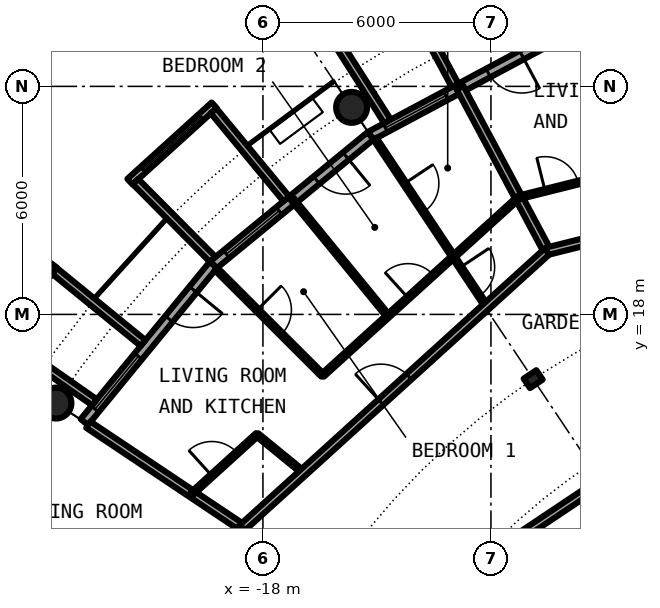
"""IFC4 building model, lengths in metres.
Left out: names, types, materials, properties, quantities, classifications, styles, units other than length and angle.
Written with IfcOpenShell. Run it as: python <this file> out.ifc"""

import sys

from ifc_helpers import new_model, si_unit, direction, frame, frame_2d, origin, origin_2d, place, context, subcontext, project, spatial, rectangle, circle, hollow_circle, i_section, extrude, element, fill, save


model = new_model("IFC4")
c1 = context("Model", 3, precision=1e-05, world=origin(), true_north=direction((0.0, 1.0)))
c2 = subcontext(c1, "Body", "Model", "MODEL_VIEW")
j1 = project(units=[si_unit("LENGTHUNIT", "METRE"), si_unit("PLANEANGLEUNIT", "RADIAN")], contexts=[c1])
p1 = place(None, origin())
s1 = spatial("IfcSite", under=j1, at=p1, CompositionType="ELEMENT")
p2 = place(p1, origin())
s2 = spatial("IfcBuilding", under=s1, at=p2, CompositionType="ELEMENT")
p3 = place(p2, frame((0.0, 0.0, 190.2)))
s3 = spatial("IfcBuildingStorey", under=s2, at=p3, CompositionType="ELEMENT", Elevation=190.2)
for number, where, z_axis, x_axis in (
    (1, (-15.667, 23.448, 0.0), (0.0, 0.0, 1.0), (1.0, 0.0, 0.0)),
    (2, (-23.448, 15.667, 0.0), (0.0, 0.0, 1.0), (1.0, 0.0, 0.0)),
):
    element("IfcColumn", number, at=place(p3, frame(where, z_axis=z_axis, x_axis=x_axis)), inside=s3, PredefinedType="COLUMN", context=c2, shape_type="SweptSolid", body=[
        extrude(hollow_circle(Radius=0.406, WallThickness=0.03, at=origin_2d()), origin(), (0.0, 0.0, 1.0), 3.05),
    ])
p4 = place(p3, frame((-10.889, 16.297, 0.0), z_axis=(0.0, 0.0, 1.0), x_axis=(-0.55557023302, 0.831469612303, 0.0)))
e3 = element("IfcColumn", 3, at=p4, inside=s3, PredefinedType="COLUMN", context=c2, shape_type="SweptSolid", body=[
    extrude(i_section(OverallWidth=0.3, OverallDepth=0.4, WebThickness=0.013, FlangeThickness=0.024, FilletRadius=0.027, at=origin_2d()), origin(), (0.0, 0.0, 1.0), 3.05),
])
p5 = place(p3, frame((-10.447, 25.222, 0.0), z_axis=(0.0, 0.0, 1.0), x_axis=(-0.881915646801, -0.471407246368, 0.0)))
e4 = element("IfcWall", 4, at=p5, inside=s3, PredefinedType="SOLIDWALL", context=c2, shape_type="SweptSolid", body=[
    extrude(rectangle(XDim=5.352, YDim=0.25, at=frame_2d((2.676, 0.0))), origin(), (0.0, 0.0, 1.0), 2.7),
])
p6 = place(p5, frame((0.841, 0.0, 0.0)))
e5 = element("IfcOpeningElement", 5, at=p6, cuts=e4, PredefinedType="OPENING", context=c2, shape_type="SweptSolid", body=[
    extrude(rectangle(XDim=1.0, YDim=2.2, at=frame_2d((0.5, 1.1))), frame((0.0, 0.135, 0.0), z_axis=(0.0, -1.0, 0.0), x_axis=(1.0, 0.0, 0.0)), (0.0, 0.0, 1.0), 0.27),
])
p7 = place(p5, frame((3.111, 0.0, 0.3)))
e6 = element("IfcOpeningElement", 6, at=p7, cuts=e4, PredefinedType="OPENING", context=c2, shape_type="SweptSolid", body=[
    extrude(rectangle(XDim=1.8, YDim=2.1, at=frame_2d((0.9, 1.05))), frame((0.0, 0.135, 0.0), z_axis=(0.0, -1.0, 0.0), x_axis=(1.0, 0.0, 0.0)), (0.0, 0.0, 1.0), 0.27),
])
p8 = place(p3, frame((-12.945, 24.029, -0.03), z_axis=(0.0, 0.0, 1.0), x_axis=(-0.474424310775, 0.88029629861, 0.0)))
e7 = element("IfcWall", 7, at=p8, inside=s3, PredefinedType="SOLIDWALL", context=c2, shape_type="SweptSolid", body=[
    extrude(rectangle(XDim=3.006, YDim=0.2, at=frame_2d((1.503, 0.0))), origin(), (0.0, 0.0, 1.0), 2.73),
])
p9 = place(p3, frame((-14.722, 23.079, -0.03), z_axis=(0.0, 0.0, 1.0), x_axis=(-0.537572179146, 0.843217737129, 0.0)))
e8 = element("IfcWall", 8, at=p9, inside=s3, PredefinedType="SOLIDWALL", context=c2, shape_type="SweptSolid", body=[
    extrude(rectangle(XDim=2.924, YDim=0.2, at=frame_2d((1.462, 0.0))), origin(), (0.0, 0.0, 1.0), 2.73),
])
p10 = place(p3, frame((-15.167, 22.699, 0.0), z_axis=(0.0, 0.0, 1.0), x_axis=(-0.773019449054, -0.634382322723, 0.0)))
e9 = element("IfcWall", 9, at=p10, inside=s3, PredefinedType="SOLIDWALL", context=c2, shape_type="SweptSolid", body=[
    extrude(rectangle(XDim=5.352, YDim=0.25, at=frame_2d((2.676, 0.0))), origin(), (0.0, 0.0, 1.0), 2.7),
])
p11 = place(p10, frame((0.841, 0.0, 0.0)))
e10 = element("IfcOpeningElement", 10, at=p11, cuts=e9, PredefinedType="OPENING", context=c2, shape_type="SweptSolid", body=[
    extrude(rectangle(XDim=1.0, YDim=2.2, at=frame_2d((0.5, 1.1))), frame((0.0, 0.135, 0.0), z_axis=(0.0, -1.0, 0.0), x_axis=(1.0, 0.0, 0.0)), (0.0, 0.0, 1.0), 0.27),
])
p12 = place(p10, frame((3.111, 0.0, 0.3)))
e11 = element("IfcOpeningElement", 11, at=p12, cuts=e9, PredefinedType="OPENING", context=c2, shape_type="SweptSolid", body=[
    extrude(rectangle(XDim=1.8, YDim=2.1, at=frame_2d((0.9, 1.05))), frame((0.0, 0.135, 0.0), z_axis=(0.0, -1.0, 0.0), x_axis=(1.0, 0.0, 0.0)), (0.0, 0.0, 1.0), 0.27),
])
p13 = place(p3, frame((-19.282, 23.503, -0.03), z_axis=(0.0, 0.0, 1.0), x_axis=(-0.740998365753, -0.671506829416, 0.0)))
e12 = element("IfcWall", 12, at=p13, inside=s3, PredefinedType="SOLIDWALL", context=c2, shape_type="SweptSolid", body=[
    extrude(rectangle(XDim=2.993, YDim=0.2, at=frame_2d((1.497, 0.0))), origin(), (0.0, 0.0, 1.0), 2.73),
])
p14 = place(p13, frame((0.457, 0.0, 0.33)))
e13 = element("IfcOpeningElement", 13, at=p14, cuts=e12, PredefinedType="OPENING", context=c2, shape_type="SweptSolid", body=[
    extrude(circle(Radius=1.04, at=frame_2d((1.04, 1.04))), frame((0.0, 0.11, 0.0), z_axis=(0.0, -1.0, 0.0), x_axis=(1.0, 0.0, 0.0)), (0.0, 0.0, 1.0), 0.22),
])
p15 = place(p3, frame((-17.384, 21.041, -0.03), z_axis=(0.0, 0.0, 1.0), x_axis=(-0.63709551667, 0.770784861449, 0.0)))
e14 = element("IfcWall", 14, at=p15, inside=s3, PredefinedType="SOLIDWALL", context=c2, shape_type="SweptSolid", body=[
    extrude(rectangle(XDim=3.006, YDim=0.2, at=frame_2d((1.503, 0.0))), origin(), (0.0, 0.0, 1.0), 2.73),
])
p16 = place(p3, frame((-19.323, 19.45, -0.03), z_axis=(0.0, 0.0, 1.0), x_axis=(-0.704476739375, 0.709727076896, 0.0)))
e15 = element("IfcWall", 15, at=p16, inside=s3, PredefinedType="SOLIDWALL", context=c2, shape_type="SweptSolid", body=[
    extrude(rectangle(XDim=2.883, YDim=0.2, at=frame_2d((1.441, 0.0))), origin(), (0.0, 0.0, 1.0), 2.73),
])
p17 = place(p3, frame((-19.304, 19.304, 0.0), z_axis=(0.0, 0.0, 1.0), x_axis=(-0.634382322723, -0.773019449054, 0.0)))
e16 = element("IfcWall", 16, at=p17, inside=s3, PredefinedType="SOLIDWALL", context=c2, shape_type="SweptSolid", body=[
    extrude(rectangle(XDim=5.352, YDim=0.25, at=frame_2d((2.676, 0.0))), origin(), (0.0, 0.0, 1.0), 2.7),
])
p18 = place(p17, frame((0.841, 0.0, 0.0)))
e17 = element("IfcOpeningElement", 17, at=p18, cuts=e16, PredefinedType="OPENING", context=c2, shape_type="SweptSolid", body=[
    extrude(rectangle(XDim=1.0, YDim=2.2, at=frame_2d((0.5, 1.1))), frame((0.0, 0.135, 0.0), z_axis=(0.0, -1.0, 0.0), x_axis=(1.0, 0.0, 0.0)), (0.0, 0.0, 1.0), 0.27),
])
p19 = place(p17, frame((3.111, 0.0, 0.3)))
e18 = element("IfcOpeningElement", 18, at=p19, cuts=e16, PredefinedType="OPENING", context=c2, shape_type="SweptSolid", body=[
    extrude(rectangle(XDim=1.8, YDim=2.1, at=frame_2d((0.9, 1.05))), frame((0.0, 0.135, 0.0), z_axis=(0.0, -1.0, 0.0), x_axis=(1.0, 0.0, 0.0)), (0.0, 0.0, 1.0), 0.27),
])
p20 = place(p3, frame((-23.497, 19.289, -0.03), z_axis=(0.0, 0.0, 1.0), x_axis=(-0.602806268067, -0.797887588059, 0.0)))
e19 = element("IfcWall", 19, at=p20, inside=s3, PredefinedType="SOLIDWALL", context=c2, shape_type="SweptSolid", body=[
    extrude(rectangle(XDim=2.447, YDim=0.2, at=frame_2d((1.223, 0.0))), origin(), (0.0, 0.0, 1.0), 2.73),
])
p21 = place(p20, frame((0.183, 0.0, 0.33)))
e20 = element("IfcOpeningElement", 20, at=p21, cuts=e19, PredefinedType="OPENING", context=c2, shape_type="SweptSolid", body=[
    extrude(circle(Radius=1.04, at=frame_2d((1.04, 1.04))), frame((0.0, 0.11, 0.0), z_axis=(0.0, -1.0, 0.0), x_axis=(1.0, 0.0, 0.0)), (0.0, 0.0, 1.0), 0.22),
])
p22 = place(p3, frame((-21.155, 17.246, -0.03), z_axis=(0.0, 0.0, 1.0), x_axis=(-0.775179004516, 0.631741648902, 0.0)))
e21 = element("IfcWall", 21, at=p22, inside=s3, PredefinedType="SOLIDWALL", context=c2, shape_type="SweptSolid", body=[
    extrude(rectangle(XDim=3.006, YDim=0.2, at=frame_2d((1.503, 0.0))), origin(), (0.0, 0.0, 1.0), 2.73),
])
p23 = place(p3, frame((-22.433, 15.688, -0.03), z_axis=(0.0, 0.0, 1.0), x_axis=(-0.819373043115, 0.573260687834, 0.0)))
e22 = element("IfcWall", 22, at=p23, inside=s3, PredefinedType="SOLIDWALL", context=c2, shape_type="SweptSolid", body=[
    extrude(rectangle(XDim=2.925, YDim=0.2, at=frame_2d((1.463, 0.0))), origin(), (0.0, 0.0, 1.0), 2.73),
])
p24 = place(p3, frame((-22.595, 15.098, 0.0), z_axis=(0.0, 0.0, 1.0), x_axis=(0.831387096605, -0.55569370664, 0.0)))
e23 = element("IfcWall", 23, at=p24, inside=s3, PredefinedType="PARTITIONING", context=c2, shape_type="SweptSolid", body=[
    extrude(rectangle(XDim=4.875, YDim=0.2, at=frame_2d((2.438, 0.0))), origin(), (0.0, 0.0, 1.0), 2.7),
])
p25 = place(p3, frame((-19.234, 19.197, 0.0), z_axis=(0.0, 0.0, 1.0), x_axis=(0.707722727509, -0.706490297858, 0.0)))
e24 = element("IfcWall", 24, at=p25, inside=s3, PredefinedType="PARTITIONING", context=c2, shape_type="SweptSolid", body=[
    extrude(rectangle(XDim=3.962, YDim=0.1, at=frame_2d((1.981, 0.0))), origin(), (0.0, 0.0, 1.0), 2.7),
])
p26 = place(p25, frame((1.531, 0.0, 0.0)))
e25 = element("IfcOpeningElement", 25, at=p26, cuts=e24, PredefinedType="OPENING", context=c2, shape_type="SweptSolid", body=[
    extrude(rectangle(XDim=0.9, YDim=2.3, at=frame_2d((0.45, 1.15))), frame((0.0, 0.06, 0.0), z_axis=(0.0, -1.0, 0.0), x_axis=(1.0, 0.0, 0.0)), (0.0, 0.0, 1.0), 0.12),
])
p27 = place(p3, frame((-18.154, 14.834, 0.0), z_axis=(0.0, 0.0, 1.0), x_axis=(0.774345345452, -0.632763214779, 0.0)))
e26 = element("IfcWall", 26, at=p27, inside=s3, PredefinedType="PARTITIONING", context=c2, shape_type="SweptSolid", body=[
    extrude(rectangle(XDim=1.569, YDim=0.1, at=frame_2d((0.785, 0.0))), origin(), (0.0, 0.0, 1.0), 2.7),
])
p28 = place(p3, frame((-17.219, 21.023, 0.0), z_axis=(0.0, 0.0, 1.0), x_axis=(0.633590098448, -0.773668913133, 0.0)))
e27 = element("IfcWall", 27, at=p28, inside=s3, PredefinedType="PARTITIONING", context=c2, shape_type="SweptSolid", body=[
    extrude(rectangle(XDim=3.962, YDim=0.1, at=frame_2d((1.981, 0.0))), origin(), (0.0, 0.0, 1.0), 2.7),
])
p29 = place(p3, frame((-15.054, 22.624, 0.0), z_axis=(0.0, 0.0, 1.0), x_axis=(0.553913391217, -0.832574294, 0.0)))
e28 = element("IfcWall", 28, at=p29, inside=s3, PredefinedType="PARTITIONING", context=c2, shape_type="SweptSolid", body=[
    extrude(rectangle(XDim=5.301, YDim=0.1, at=frame_2d((2.65, 0.0))), origin(), (0.0, 0.0, 1.0), 2.7),
])
p30 = place(p29, frame((4.065, 0.0, 0.0)))
e29 = element("IfcOpeningElement", 29, at=p30, cuts=e28, PredefinedType="OPENING", context=c2, shape_type="SweptSolid", body=[
    extrude(rectangle(XDim=0.9, YDim=2.3, at=frame_2d((0.45, 1.15))), frame((0.0, 0.06, 0.0), z_axis=(0.0, -1.0, 0.0), x_axis=(1.0, 0.0, 0.0)), (0.0, 0.0, 1.0), 0.12),
])
p31 = place(p29, frame((1.415, 0.0, 0.0)))
e30 = element("IfcOpeningElement", 30, at=p31, cuts=e28, PredefinedType="OPENING", context=c2, shape_type="SweptSolid", body=[
    extrude(rectangle(XDim=0.9, YDim=2.3, at=frame_2d((0.45, 1.15))), frame((0.0, 0.06, 0.0), z_axis=(0.0, -1.0, 0.0), x_axis=(1.0, 0.0, 0.0)), (0.0, 0.0, 1.0), 0.12),
])
p32 = place(p3, frame((-12.814, 23.964, 0.0), z_axis=(0.0, 0.0, 1.0), x_axis=(0.471388689095, -0.881925565903, 0.0)))
e31 = element("IfcWall", 31, at=p32, inside=s3, PredefinedType="PARTITIONING", context=c2, shape_type="SweptSolid", body=[
    extrude(rectangle(XDim=4.875, YDim=0.2, at=frame_2d((2.438, 0.0))), origin(), (0.0, 0.0, 1.0), 2.7),
])
p33 = place(p3, frame((-14.718, 9.832, 0.0), z_axis=(0.0, 0.0, 1.0), x_axis=(0.831437137577, 0.555618831806, 0.0)))
e32 = element("IfcWall", 32, at=p33, inside=s3, PredefinedType="PARTITIONING", context=c2, shape_type="SweptSolid", body=[
    extrude(rectangle(XDim=13.549, YDim=0.2, at=frame_2d((6.774, 0.0))), origin(), (0.0, 0.0, 1.0), 2.7),
])
p34 = place(p33, frame((7.968, 0.0, 0.0)))
e33 = element("IfcOpeningElement", 33, at=p34, cuts=e32, PredefinedType="OPENING", context=c2, shape_type="SweptSolid", body=[
    extrude(rectangle(XDim=1.0, YDim=2.3, at=frame_2d((0.5, 1.15))), frame((0.0, 0.11, 0.0), z_axis=(0.0, -1.0, 0.0), x_axis=(1.0, 0.0, 0.0)), (0.0, 0.0, 1.0), 0.22),
])
p35 = place(p3, frame((-18.543, 12.386, 0.0), z_axis=(0.0, 0.0, 1.0), x_axis=(0.740853508928, 0.671666642248, 0.0)))
e34 = element("IfcWall", 34, at=p35, inside=s3, PredefinedType="PARTITIONING", context=c2, shape_type="SweptSolid", body=[
    extrude(rectangle(XDim=10.84, YDim=0.2, at=frame_2d((5.42, 0.0))), origin(), (0.0, 0.0, 1.0), 2.7),
])
p36 = place(p35, frame((4.921, 0.0, 0.0)))
e35 = element("IfcOpeningElement", 35, at=p36, cuts=e34, PredefinedType="OPENING", context=c2, shape_type="SweptSolid", body=[
    extrude(rectangle(XDim=1.0, YDim=2.3, at=frame_2d((0.5, 1.15))), frame((0.0, 0.11, 0.0), z_axis=(0.0, -1.0, 0.0), x_axis=(1.0, 0.0, 0.0)), (0.0, 0.0, 1.0), 0.22),
])
p37 = place(p3, frame((-10.521, 19.662, 0.0), z_axis=(0.0, 0.0, 1.0), x_axis=(0.969975443945, 0.243202874456, 0.0)))
e36 = element("IfcWall", 36, at=p37, inside=s3, PredefinedType="PARTITIONING", context=c2, shape_type="SweptSolid", body=[
    extrude(rectangle(XDim=10.847, YDim=0.2, at=frame_2d((5.423, 0.0))), origin(), (0.0, 0.0, 1.0), 2.7),
])
p38 = place(p37, frame((4.928, 0.0, 0.0)))
e37 = element("IfcOpeningElement", 37, at=p38, cuts=e36, PredefinedType="OPENING", context=c2, shape_type="SweptSolid", body=[
    extrude(rectangle(XDim=1.0, YDim=2.3, at=frame_2d((0.5, 1.15))), frame((0.0, 0.11, 0.0), z_axis=(0.0, -1.0, 0.0), x_axis=(1.0, 0.0, 0.0)), (0.0, 0.0, 1.0), 0.22),
])
p39 = place(p3, frame((-19.317, 10.915, 0.0), z_axis=(0.0, 0.0, 1.0), x_axis=(0.465359652486, 0.885121683068, 0.0)))
e38 = element("IfcWall", 38, at=p39, inside=s3, PredefinedType="PARTITIONING", context=c2, shape_type="SweptSolid", body=[
    extrude(rectangle(XDim=1.665, YDim=0.2, at=frame_2d((0.833, 0.0))), origin(), (0.0, 0.0, 1.0), 2.7),
])
p40 = place(p3, frame((-19.872, 13.278, 0.0), z_axis=(0.0, 0.0, 1.0), x_axis=(0.740990220108, 0.671515817911, 0.0)))
e39 = element("IfcWall", 39, at=p40, inside=s3, PredefinedType="PARTITIONING", context=c2, shape_type="SweptSolid", body=[
    extrude(rectangle(XDim=2.323, YDim=0.1, at=frame_2d((1.161, 0.0))), origin(), (0.0, 0.0, 1.0), 2.7),
])
p41 = place(p40, frame((0.711, 0.0, 0.0)))
e40 = element("IfcOpeningElement", 40, at=p41, cuts=e39, PredefinedType="OPENING", context=c2, shape_type="SweptSolid", body=[
    extrude(rectangle(XDim=0.9, YDim=2.3, at=frame_2d((0.45, 1.15))), frame((0.0, 0.06, 0.0), z_axis=(0.0, -1.0, 0.0), x_axis=(1.0, 0.0, 0.0)), (0.0, 0.0, 1.0), 0.12),
])
p42 = place(p3, frame((-16.43, 16.398, 0.0), z_axis=(0.0, 0.0, 1.0), x_axis=(0.740934061958, 0.671577780923, 0.0)))
e41 = element("IfcWall", 41, at=p42, inside=s3, PredefinedType="PARTITIONING", context=c2, shape_type="SweptSolid", body=[
    extrude(rectangle(XDim=6.963, YDim=0.1, at=frame_2d((3.481, 0.0))), origin(), (0.0, 0.0, 1.0), 2.7),
])
p43 = place(p42, frame((3.034, 0.0, 0.0)))
e42 = element("IfcOpeningElement", 42, at=p43, cuts=e41, PredefinedType="OPENING", context=c2, shape_type="SweptSolid", body=[
    extrude(rectangle(XDim=0.9, YDim=2.3, at=frame_2d((0.45, 1.15))), frame((0.0, 0.06, 0.0), z_axis=(0.0, -1.0, 0.0), x_axis=(1.0, 0.0, 0.0)), (0.0, 0.0, 1.0), 0.12),
])
p44 = place(p3, frame((-11.266, 21.078, 0.0), z_axis=(0.0, 0.0, 1.0), x_axis=(0.970074478144, 0.242807551066, 0.0)))
e43 = element("IfcWall", 43, at=p44, inside=s3, PredefinedType="PARTITIONING", context=c2, shape_type="SweptSolid", body=[
    extrude(rectangle(XDim=2.324, YDim=0.1, at=frame_2d((1.162, 0.0))), origin(), (0.0, 0.0, 1.0), 2.7),
])
p45 = place(p44, frame((0.712, 0.0, 0.0)))
e44 = element("IfcOpeningElement", 44, at=p45, cuts=e43, PredefinedType="OPENING", context=c2, shape_type="SweptSolid", body=[
    extrude(rectangle(XDim=0.9, YDim=2.3, at=frame_2d((0.45, 1.15))), frame((0.0, 0.06, 0.0), z_axis=(0.0, -1.0, 0.0), x_axis=(1.0, 0.0, 0.0)), (0.0, 0.0, 1.0), 0.12),
])
p46 = place(p6, origin())
e45 = element("IfcDoor", 45, at=p46, inside=s3, OperationType="SINGLE_SWING_LEFT", PredefinedType="DOOR", context=c2, shape_type="SweptSolid", body=[
    extrude(rectangle(XDim=1.0, YDim=2.2, at=frame_2d((0.5, 1.1))), frame((0.0, 0.025, 0.0), z_axis=(0.0, -1.0, 0.0), x_axis=(1.0, 0.0, 0.0)), (0.0, 0.0, 1.0), 0.05),
])
fill(e5, e45)
p47 = place(p7, origin())
e46 = element("IfcWindow", 46, at=p47, inside=s3, PartitioningType="SINGLE_PANEL", PredefinedType="WINDOW", context=c2, shape_type="SweptSolid", body=[
    extrude(rectangle(XDim=1.8, YDim=2.1, at=frame_2d((0.9, 1.05))), frame((0.0, 0.03, 0.0), z_axis=(0.0, -1.0, 0.0), x_axis=(1.0, 0.0, 0.0)), (0.0, 0.0, 1.0), 0.06),
])
fill(e6, e46)
p48 = place(p11, origin())
e47 = element("IfcDoor", 47, at=p48, inside=s3, OperationType="SINGLE_SWING_LEFT", PredefinedType="DOOR", context=c2, shape_type="SweptSolid", body=[
    extrude(rectangle(XDim=1.0, YDim=2.2, at=frame_2d((0.5, 1.1))), frame((0.0, 0.025, 0.0), z_axis=(0.0, -1.0, 0.0), x_axis=(1.0, 0.0, 0.0)), (0.0, 0.0, 1.0), 0.05),
])
fill(e10, e47)
p49 = place(p12, origin())
e48 = element("IfcWindow", 48, at=p49, inside=s3, PartitioningType="SINGLE_PANEL", PredefinedType="WINDOW", context=c2, shape_type="SweptSolid", body=[
    extrude(rectangle(XDim=1.8, YDim=2.1, at=frame_2d((0.9, 1.05))), frame((0.0, 0.03, 0.0), z_axis=(0.0, -1.0, 0.0), x_axis=(1.0, 0.0, 0.0)), (0.0, 0.0, 1.0), 0.06),
])
fill(e11, e48)
p50 = place(p14, origin())
e49 = element("IfcWindow", 49, at=p50, inside=s3, PartitioningType="SINGLE_PANEL", PredefinedType="WINDOW", context=c2, shape_type="SweptSolid", body=[
    extrude(circle(Radius=1.04, at=frame_2d((1.04, 1.04))), frame((0.0, 0.03, 0.0), z_axis=(0.0, -1.0, 0.0), x_axis=(1.0, 0.0, 0.0)), (0.0, 0.0, 1.0), 0.06),
])
fill(e13, e49)
p51 = place(p18, origin())
e50 = element("IfcDoor", 50, at=p51, inside=s3, OperationType="SINGLE_SWING_LEFT", PredefinedType="DOOR", context=c2, shape_type="SweptSolid", body=[
    extrude(rectangle(XDim=1.0, YDim=2.2, at=frame_2d((0.5, 1.1))), frame((0.0, 0.025, 0.0), z_axis=(0.0, -1.0, 0.0), x_axis=(1.0, 0.0, 0.0)), (0.0, 0.0, 1.0), 0.05),
])
fill(e17, e50)
p52 = place(p19, origin())
e51 = element("IfcWindow", 51, at=p52, inside=s3, PartitioningType="SINGLE_PANEL", PredefinedType="WINDOW", context=c2, shape_type="SweptSolid", body=[
    extrude(rectangle(XDim=1.8, YDim=2.1, at=frame_2d((0.9, 1.05))), frame((0.0, 0.03, 0.0), z_axis=(0.0, -1.0, 0.0), x_axis=(1.0, 0.0, 0.0)), (0.0, 0.0, 1.0), 0.06),
])
fill(e18, e51)
p53 = place(p45, origin())
e52 = element("IfcDoor", 52, at=p53, inside=s3, OperationType="SINGLE_SWING_LEFT", PredefinedType="DOOR", context=c2, shape_type="SweptSolid", body=[
    extrude(rectangle(XDim=0.9, YDim=2.3, at=frame_2d((0.45, 1.15))), frame((0.0, 0.025, 0.0), z_axis=(0.0, -1.0, 0.0), x_axis=(1.0, 0.0, 0.0)), (0.0, 0.0, 1.0), 0.05),
])
fill(e44, e52)
p54 = place(p36, origin())
e53 = element("IfcDoor", 53, at=p54, inside=s3, OperationType="SINGLE_SWING_RIGHT", PredefinedType="DOOR", context=c2, shape_type="SweptSolid", body=[
    extrude(rectangle(XDim=1.0, YDim=2.3, at=frame_2d((0.5, 1.15))), frame((0.0, 0.025, 0.0), z_axis=(0.0, -1.0, 0.0), x_axis=(1.0, 0.0, 0.0)), (0.0, 0.0, 1.0), 0.05),
])
fill(e35, e53)
p55 = place(p41, origin())
e54 = element("IfcDoor", 54, at=p55, inside=s3, OperationType="SINGLE_SWING_LEFT", PredefinedType="DOOR", context=c2, shape_type="SweptSolid", body=[
    extrude(rectangle(XDim=0.9, YDim=2.3, at=frame_2d((0.45, 1.15))), frame((0.0, 0.025, 0.0), z_axis=(0.0, -1.0, 0.0), x_axis=(1.0, 0.0, 0.0)), (0.0, 0.0, 1.0), 0.05),
])
fill(e40, e54)
p56 = place(p30, origin())
e55 = element("IfcDoor", 55, at=p56, inside=s3, OperationType="SINGLE_SWING_RIGHT", PredefinedType="DOOR", context=c2, shape_type="SweptSolid", body=[
    extrude(rectangle(XDim=0.9, YDim=2.3, at=frame_2d((0.45, 1.15))), frame((0.0, 0.025, 0.0), z_axis=(0.0, -1.0, 0.0), x_axis=(1.0, 0.0, 0.0)), (0.0, 0.0, 1.0), 0.05),
])
fill(e29, e55)
p57 = place(p26, origin())
e56 = element("IfcDoor", 56, at=p57, inside=s3, OperationType="SINGLE_SWING_LEFT", PredefinedType="DOOR", context=c2, shape_type="SweptSolid", body=[
    extrude(rectangle(XDim=0.9, YDim=2.3, at=frame_2d((0.45, 1.15))), frame((0.0, 0.025, 0.0), z_axis=(0.0, -1.0, 0.0), x_axis=(1.0, 0.0, 0.0)), (0.0, 0.0, 1.0), 0.05),
])
fill(e25, e56)
p58 = place(p43, origin())
e57 = element("IfcDoor", 57, at=p58, inside=s3, OperationType="SINGLE_SWING_RIGHT", PredefinedType="DOOR", context=c2, shape_type="SweptSolid", body=[
    extrude(rectangle(XDim=0.9, YDim=2.3, at=frame_2d((0.45, 1.15))), frame((0.0, 0.025, 0.0), z_axis=(0.0, -1.0, 0.0), x_axis=(1.0, 0.0, 0.0)), (0.0, 0.0, 1.0), 0.05),
])
fill(e42, e57)
p59 = place(p31, origin())
e58 = element("IfcDoor", 58, at=p59, inside=s3, OperationType="SINGLE_SWING_LEFT", PredefinedType="DOOR", context=c2, shape_type="SweptSolid", body=[
    extrude(rectangle(XDim=0.9, YDim=2.3, at=frame_2d((0.45, 1.15))), frame((0.0, 0.025, 0.0), z_axis=(0.0, -1.0, 0.0), x_axis=(1.0, 0.0, 0.0)), (0.0, 0.0, 1.0), 0.05),
])
fill(e30, e58)
save(model, sys.argv[1])
